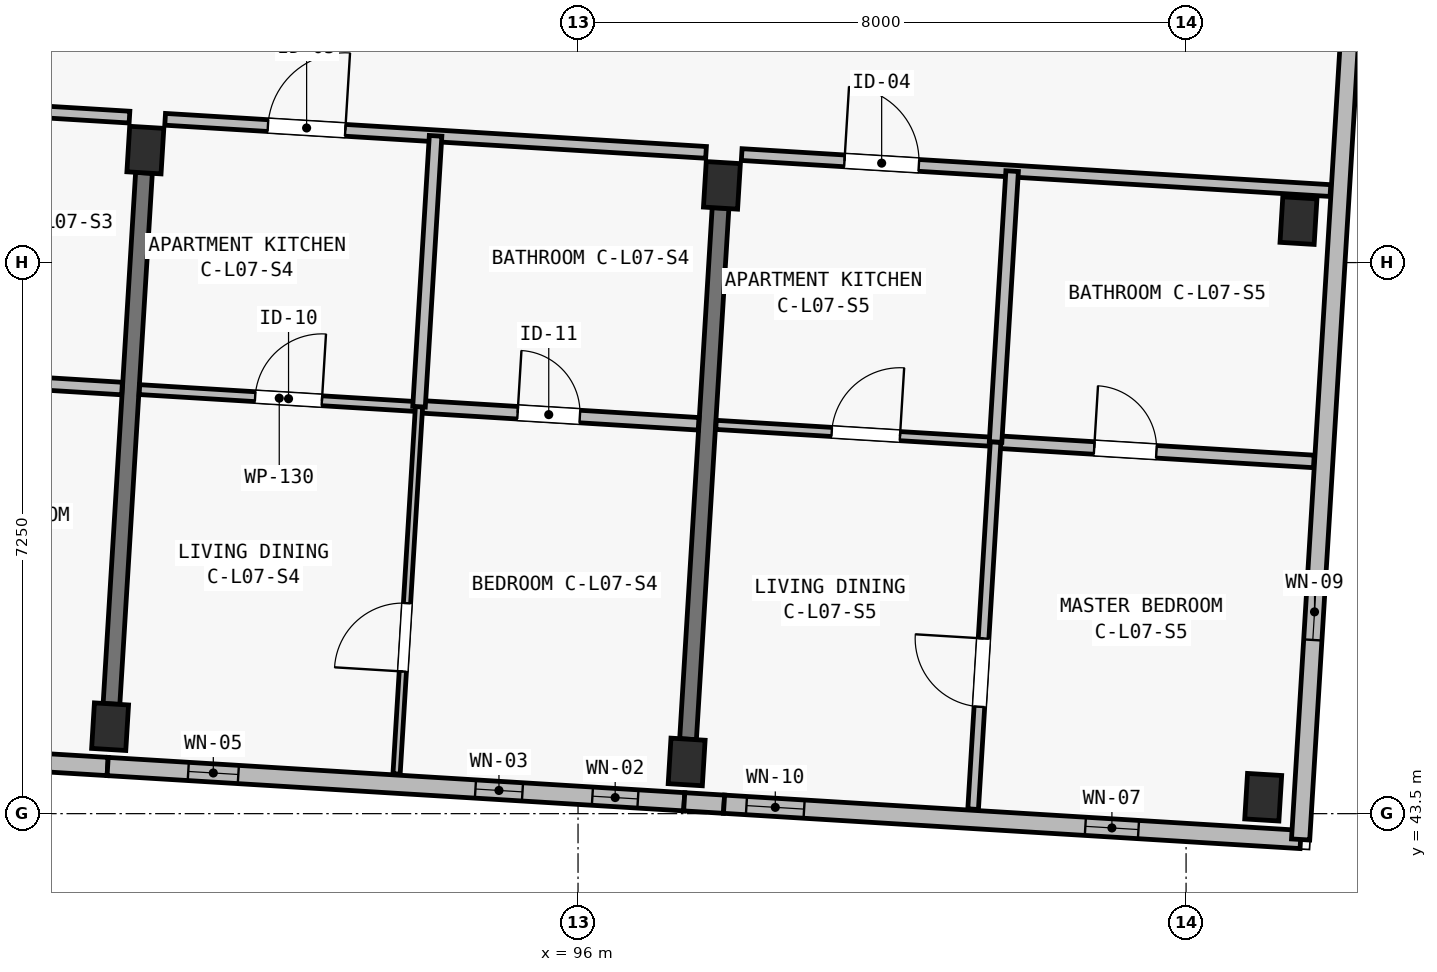
"""IFC4 building model, lengths in metres.
Left out: names, types, materials, properties, quantities, classifications, styles, units other than length and angle.
Written with IfcOpenShell. Run it as: python <this file> out.ifc"""

import sys

from ifc_helpers import new_model, si_unit, direction, frame, frame_2d, origin, origin_2d, place, context, subcontext, project, spatial, polyline, rectangle, outline, extrude, element, fill, save


model = new_model("IFC4")
c1 = context("Model", 3, precision=1e-05, world=origin(), true_north=direction((0.0, 1.0)))
c2 = subcontext(c1, "Body", "Model", "MODEL_VIEW")
j1 = project(units=[si_unit("LENGTHUNIT", "METRE"), si_unit("PLANEANGLEUNIT", "RADIAN")], contexts=[c1])
p1 = place(None, origin())
s1 = spatial("IfcSite", under=j1, at=p1, CompositionType="ELEMENT")
p2 = place(p1, origin())
s2 = spatial("IfcBuilding", under=s1, at=p2, CompositionType="ELEMENT")
p3 = place(p2, frame((0.0, 0.0, 24.65)))
s3 = spatial("IfcBuildingStorey", under=s2, at=p3, CompositionType="ELEMENT", Elevation=24.65)
for number, where, z_axis, x_axis in (
    (1, (89.843, 44.644, 0.0), (0.0, 0.0, 1.0), (0.998, -0.061, 0.0)),
    (2, (90.307, 52.23, 0.0), (0.0, 0.0, 1.0), (0.998, -0.061, 0.0)),
    (3, (97.429, 44.18, 0.0), (0.0, 0.0, 1.0), (0.998, -0.061, 0.0)),
    (4, (97.893, 51.766, 0.0), (0.0, 0.0, 1.0), (0.998, -0.061, 0.0)),
):
    element("IfcColumn", number, at=place(p3, frame(where, z_axis=z_axis, x_axis=x_axis)), inside=s3, PredefinedType="COLUMN", context=c2, shape_type="SweptSolid", body=[
        extrude(rectangle(XDim=0.45, YDim=0.6, at=origin_2d()), origin(), (0.0, 0.0, 1.0), 3.25),
    ])
for number, where, z_axis, x_axis in (
    (5, (105.015, 43.716, 0.0), (0.0, 0.0, 1.0), (0.998, -0.061, 0.0)),
    (6, (105.479, 51.302, 0.0), (0.0, 0.0, 1.0), (0.998, -0.061, 0.0)),
):
    element("IfcColumn", number, at=place(p3, frame(where, z_axis=z_axis, x_axis=x_axis)), inside=s3, PredefinedType="COLUMN", context=c2, shape_type="SweptSolid", body=[
        extrude(rectangle(XDim=0.45, YDim=0.6, at=origin_2d()), origin(), (0.0, 0.0, 1.0), 4.701),
    ])
for number, where, z_axis, x_axis in (
    (7, (89.862, 44.944, 0.0), (0.0, 0.0, 1.0), (0.061, 0.998, 0.0)),
    (8, (97.448, 44.479, 0.0), (0.0, 0.0, 1.0), (0.061, 0.998, 0.0)),
):
    element("IfcWall", number, at=place(p3, frame(where, z_axis=z_axis, x_axis=x_axis)), inside=s3, PredefinedType="SHEAR", context=c2, shape_type="SweptSolid", body=[
        extrude(rectangle(XDim=7.0, YDim=0.22, at=frame_2d((3.5, 0.0))), origin(), (0.0, 0.0, 1.0), 2.5),
    ])
p4 = place(p3, frame((89.811, 44.12, 0.0), z_axis=(0.0, 0.0, 1.0), x_axis=(-0.998135669243, 0.061034300063, 0.0)))
e9 = element("IfcWall", 9, at=p4, inside=s3, PredefinedType="SOLIDWALL", context=c2, shape_type="SweptSolid", body=[
    extrude(rectangle(XDim=7.6, YDim=0.24, at=frame_2d((3.8, 0.0))), origin(), (0.0, 0.0, 1.0), 3.0),
])
p5 = place(p4, frame((5.019, 0.0, 0.0)))
e10 = element("IfcOpeningElement", 10, at=p5, cuts=e9, PredefinedType="OPENING", context=c2, shape_type="SweptSolid", body=[
    extrude(rectangle(XDim=1.8, YDim=2.12, at=frame_2d((0.9, 1.06))), frame((0.0, 0.135, 0.0), z_axis=(0.0, -1.0, 0.0), x_axis=(1.0, 0.0, 0.0)), (0.0, 0.0, 1.0), 0.27),
])
p6 = place(p4, frame((0.83, 0.0, 0.46)))
e11 = element("IfcOpeningElement", 11, at=p6, cuts=e9, PredefinedType="OPENING", context=c2, shape_type="SweptSolid", body=[
    extrude(rectangle(XDim=0.7, YDim=2.36, at=frame_2d((0.35, 1.18))), frame((0.0, 0.135, 0.0), z_axis=(0.0, -1.0, 0.0), x_axis=(1.0, 0.0, 0.0)), (0.0, 0.0, 1.0), 0.27),
])
p7 = place(p3, frame((97.397, 43.656, 0.0), z_axis=(0.0, 0.0, 1.0), x_axis=(-0.998135549572, 0.061036257095, 0.0)))
e12 = element("IfcWall", 12, at=p7, inside=s3, PredefinedType="SOLIDWALL", context=c2, shape_type="SweptSolid", body=[
    extrude(rectangle(XDim=7.6, YDim=0.24, at=frame_2d((3.8, 0.0))), origin(), (0.0, 0.0, 1.0), 3.0),
])
p8 = place(p7, frame((0.61, 0.0, 0.52)))
e13 = element("IfcOpeningElement", 13, at=p8, cuts=e12, PredefinedType="OPENING", context=c2, shape_type="SweptSolid", body=[
    extrude(rectangle(XDim=0.6, YDim=2.22, at=frame_2d((0.3, 1.11))), frame((0.0, 0.135, 0.0), z_axis=(0.0, -1.0, 0.0), x_axis=(1.0, 0.0, 0.0)), (0.0, 0.0, 1.0), 0.27),
])
p9 = place(p7, frame((2.132, 0.0, 0.42)))
e14 = element("IfcOpeningElement", 14, at=p9, cuts=e12, PredefinedType="OPENING", context=c2, shape_type="SweptSolid", body=[
    extrude(rectangle(XDim=0.62, YDim=2.28, at=frame_2d((0.31, 1.14))), frame((0.0, 0.135, 0.0), z_axis=(0.0, -1.0, 0.0), x_axis=(1.0, 0.0, 0.0)), (0.0, 0.0, 1.0), 0.27),
])
p10 = place(p7, frame((5.877, 0.0, 0.52)))
e15 = element("IfcOpeningElement", 15, at=p10, cuts=e12, PredefinedType="OPENING", context=c2, shape_type="SweptSolid", body=[
    extrude(rectangle(XDim=0.66, YDim=2.32, at=frame_2d((0.33, 1.16))), frame((0.0, 0.135, 0.0), z_axis=(0.0, -1.0, 0.0), x_axis=(1.0, 0.0, 0.0)), (0.0, 0.0, 1.0), 0.27),
])
p11 = place(p3, frame((97.921, 43.624, 0.0), z_axis=(0.0, 0.0, 1.0), x_axis=(-0.99811537606, 0.061365267648, 0.0)))
e16 = element("IfcWall", 16, at=p11, inside=s3, PredefinedType="SOLIDWALL", context=c2, shape_type="SweptSolid", body=[
    extrude(rectangle(XDim=0.525, YDim=0.24, at=frame_2d((0.263, 0.0))), origin(), (0.0, 0.0, 1.0), 3.0),
])
p12 = place(p3, frame((105.507, 43.16, 0.0), z_axis=(0.0, 0.0, 1.0), x_axis=(-0.998135549572, 0.061036257095, 0.0)))
e17 = element("IfcWall", 17, at=p12, inside=s3, PredefinedType="SOLIDWALL", context=c2, shape_type="SweptSolid", body=[
    extrude(outline(polyline([(0.0, 0.0), (7.6, 0.0), (7.6, 6.548), (0.0, 5.085), (0.0, 0.0)])), frame((0.0, 0.12, 0.0), z_axis=(0.0, -1.0, 0.0), x_axis=(1.0, 0.0, 0.0)), (0.0, 0.0, 1.0), 0.24),
])
p13 = place(p12, frame((2.137, 0.0, 0.42)))
e18 = element("IfcOpeningElement", 18, at=p13, cuts=e17, PredefinedType="OPENING", context=c2, shape_type="SweptSolid", body=[
    extrude(rectangle(XDim=0.7, YDim=2.36, at=frame_2d((0.35, 1.18))), frame((0.0, 0.135, 0.0), z_axis=(0.0, -1.0, 0.0), x_axis=(1.0, 0.0, 0.0)), (0.0, 0.0, 1.0), 0.27),
])
p14 = place(p12, frame((6.545, 0.0, 0.42)))
e19 = element("IfcOpeningElement", 19, at=p14, cuts=e17, PredefinedType="OPENING", context=c2, shape_type="SweptSolid", body=[
    extrude(rectangle(XDim=0.76, YDim=2.34, at=frame_2d((0.38, 1.17))), frame((0.0, 0.135, 0.0), z_axis=(0.0, -1.0, 0.0), x_axis=(1.0, 0.0, 0.0)), (0.0, 0.0, 1.0), 0.27),
])
p15 = place(p3, frame((106.768, 63.771, 0.0), z_axis=(0.0, 0.0, 1.0), x_axis=(-0.061053332998, -0.99813450523, 0.0)))
e20 = element("IfcWall", 20, at=p15, inside=s3, PredefinedType="SOLIDWALL", context=c2, shape_type="SweptSolid", body=[
    extrude(rectangle(XDim=20.65, YDim=0.24, at=frame_2d((10.325, 0.0))), origin(), (0.0, 0.0, 1.0), 5.085),
])
p16 = place(p15, frame((2.99, 0.0, 0.52)))
e21 = element("IfcOpeningElement", 21, at=p16, cuts=e20, PredefinedType="OPENING", context=c2, shape_type="SweptSolid", body=[
    extrude(rectangle(XDim=0.6, YDim=2.22, at=frame_2d((0.3, 1.11))), frame((0.0, 0.135, 0.0), z_axis=(0.0, -1.0, 0.0), x_axis=(1.0, 0.0, 0.0)), (0.0, 0.0, 1.0), 0.27),
])
p17 = place(p15, frame((17.28, 0.0, 0.45)))
e22 = element("IfcOpeningElement", 22, at=p17, cuts=e20, PredefinedType="OPENING", context=c2, shape_type="SweptSolid", body=[
    extrude(rectangle(XDim=0.74, YDim=2.26, at=frame_2d((0.37, 1.13))), frame((0.0, 0.135, 0.0), z_axis=(0.0, -1.0, 0.0), x_axis=(1.0, 0.0, 0.0)), (0.0, 0.0, 1.0), 0.27),
])
p18 = place(p3, frame((82.982, 53.099, 0.0), z_axis=(0.0, 0.0, 1.0), x_axis=(0.998134569689, -0.061052279168, 0.0)))
e23 = element("IfcWall", 23, at=p18, inside=s3, PredefinedType="PARTITIONING", context=c2, shape_type="SweptSolid", body=[
    extrude(rectangle(XDim=7.13, YDim=0.155, at=frame_2d((3.565, 0.0))), origin(), (0.0, 0.0, 1.0), 2.97),
])
p19 = place(p18, frame((1.355, 0.0, 0.0)))
e24 = element("IfcOpeningElement", 24, at=p19, cuts=e23, PredefinedType="OPENING", context=c2, shape_type="SweptSolid", body=[
    extrude(rectangle(XDim=0.98, YDim=2.15, at=frame_2d((0.49, 1.075))), frame((0.0, 0.093, 0.0), z_axis=(0.0, -1.0, 0.0), x_axis=(1.0, 0.0, 0.0)), (0.0, 0.0, 1.0), 0.185),
])
p20 = place(p3, frame((86.322, 49.318, 0.0), z_axis=(0.0, 0.0, 1.0), x_axis=(0.998132682596, -0.061083123148, 0.0)))
e25 = element("IfcWall", 25, at=p20, inside=s3, PredefinedType="PLUMBINGWALL", context=c2, shape_type="SweptSolid", body=[
    extrude(rectangle(XDim=3.685, YDim=0.165, at=frame_2d((1.843, 0.0))), origin(), (0.0, 0.0, 1.0), 2.97),
])
p21 = place(p20, frame((1.3, 0.0, 0.0)))
e26 = element("IfcOpeningElement", 26, at=p21, cuts=e25, PredefinedType="OPENING", context=c2, shape_type="SweptSolid", body=[
    extrude(rectangle(XDim=0.82, YDim=2.08, at=frame_2d((0.41, 1.04))), frame((0.0, 0.097, 0.0), z_axis=(0.0, -1.0, 0.0), x_axis=(1.0, 0.0, 0.0)), (0.0, 0.0, 1.0), 0.195),
])
p22 = place(p3, frame((90.567, 52.635, 0.0), z_axis=(0.0, 0.0, 1.0), x_axis=(0.998134569689, -0.061052279168, 0.0)))
e27 = element("IfcWall", 27, at=p22, inside=s3, PredefinedType="PARTITIONING", context=c2, shape_type="SweptSolid", body=[
    extrude(rectangle(XDim=7.13, YDim=0.155, at=frame_2d((3.565, 0.0))), origin(), (0.0, 0.0, 1.0), 2.97),
])
p23 = place(p22, frame((1.355, 0.0, 0.0)))
e28 = element("IfcOpeningElement", 28, at=p23, cuts=e27, PredefinedType="OPENING", context=c2, shape_type="SweptSolid", body=[
    extrude(rectangle(XDim=1.02, YDim=2.2, at=frame_2d((0.51, 1.1))), frame((0.0, 0.093, 0.0), z_axis=(0.0, -1.0, 0.0), x_axis=(1.0, 0.0, 0.0)), (0.0, 0.0, 1.0), 0.185),
])
p24 = place(p3, frame((90.23, 49.079, 0.0), z_axis=(0.0, 0.0, 1.0), x_axis=(0.998132682596, -0.061083123148, 0.0)))
e29 = element("IfcWall", 29, at=p24, inside=s3, PredefinedType="PARTITIONING", context=c2, shape_type="SweptSolid", body=[
    extrude(rectangle(XDim=3.685, YDim=0.13, at=frame_2d((1.843, 0.0))), origin(), (0.0, 0.0, 1.0), 2.97),
])
p25 = place(p24, frame((1.525, 0.0, 0.0)))
e30 = element("IfcOpeningElement", 30, at=p25, cuts=e29, PredefinedType="OPENING", context=c2, shape_type="SweptSolid", body=[
    extrude(rectangle(XDim=0.88, YDim=2.1, at=frame_2d((0.44, 1.05))), frame((0.0, 0.08, 0.0), z_axis=(0.0, -1.0, 0.0), x_axis=(1.0, 0.0, 0.0)), (0.0, 0.0, 1.0), 0.16),
])
p26 = place(p3, frame((93.908, 48.854, 0.0), z_axis=(0.0, 0.0, 1.0), x_axis=(0.998136472989, -0.061021154439, 0.0)))
e31 = element("IfcWall", 31, at=p26, inside=s3, PredefinedType="PLUMBINGWALL", context=c2, shape_type="SweptSolid", body=[
    extrude(rectangle(XDim=3.685, YDim=0.165, at=frame_2d((1.842, 0.0))), origin(), (0.0, 0.0, 1.0), 2.97),
])
p27 = place(p26, frame((1.3, 0.0, 0.0)))
e32 = element("IfcOpeningElement", 32, at=p27, cuts=e31, PredefinedType="OPENING", context=c2, shape_type="SweptSolid", body=[
    extrude(rectangle(XDim=0.82, YDim=2.08, at=frame_2d((0.41, 1.04))), frame((0.0, 0.097, 0.0), z_axis=(0.0, -1.0, 0.0), x_axis=(1.0, 0.0, 0.0)), (0.0, 0.0, 1.0), 0.195),
])
p28 = place(p3, frame((93.612, 44.023, 0.0), z_axis=(0.0, 0.0, 1.0), x_axis=(0.061087499584, 0.99813241476, 0.0)))
e33 = element("IfcWall", 33, at=p28, inside=s3, PredefinedType="PARTITIONING", context=c2, shape_type="SweptSolid", body=[
    extrude(rectangle(XDim=4.84, YDim=0.095, at=frame_2d((2.42, 0.0))), origin(), (0.0, 0.0, 1.0), 2.97),
])
p29 = place(p28, frame((1.35, 0.0, 0.0)))
e34 = element("IfcOpeningElement", 34, at=p29, cuts=e33, PredefinedType="OPENING", context=c2, shape_type="SweptSolid", body=[
    extrude(rectangle(XDim=0.9, YDim=2.1, at=frame_2d((0.45, 1.05))), frame((0.0, 0.062, 0.0), z_axis=(0.0, -1.0, 0.0), x_axis=(1.0, 0.0, 0.0)), (0.0, 0.0, 1.0), 0.125),
])
p30 = place(p3, frame((93.908, 48.854, 0.0), z_axis=(0.0, 0.0, 1.0), x_axis=(0.060998831939, 0.998137837426, 0.0)))
e35 = element("IfcWall", 35, at=p30, inside=s3, PredefinedType="PLUMBINGWALL", context=c2, shape_type="SweptSolid", body=[
    extrude(rectangle(XDim=3.57, YDim=0.165, at=frame_2d((1.785, 0.0))), origin(), (0.0, 0.0, 1.0), 2.97),
])
p31 = place(p3, frame((98.153, 52.171, 0.0), z_axis=(0.0, 0.0, 1.0), x_axis=(0.998133734847, -0.061065926349, 0.0)))
e36 = element("IfcWall", 36, at=p31, inside=s3, PredefinedType="PARTITIONING", context=c2, shape_type="SweptSolid", body=[
    extrude(rectangle(XDim=7.76, YDim=0.155, at=frame_2d((3.88, 0.0))), origin(), (0.0, 0.0, 1.0), 2.97),
])
p32 = place(p31, frame((1.355, 0.0, 0.0)))
e37 = element("IfcOpeningElement", 37, at=p32, cuts=e36, PredefinedType="OPENING", context=c2, shape_type="SweptSolid", body=[
    extrude(rectangle(XDim=0.98, YDim=2.15, at=frame_2d((0.49, 1.075))), frame((0.0, 0.093, 0.0), z_axis=(0.0, -1.0, 0.0), x_axis=(1.0, 0.0, 0.0)), (0.0, 0.0, 1.0), 0.185),
])
p33 = place(p3, frame((97.816, 48.615, 0.0), z_axis=(0.0, 0.0, 1.0), x_axis=(0.998136472989, -0.061021154439, 0.0)))
e38 = element("IfcWall", 38, at=p33, inside=s3, PredefinedType="PARTITIONING", context=c2, shape_type="SweptSolid", body=[
    extrude(rectangle(XDim=3.685, YDim=0.12, at=frame_2d((1.842, 0.0))), origin(), (0.0, 0.0, 1.0), 2.97),
])
p34 = place(p33, frame((1.525, 0.0, 0.0)))
e39 = element("IfcOpeningElement", 39, at=p34, cuts=e38, PredefinedType="OPENING", context=c2, shape_type="SweptSolid", body=[
    extrude(rectangle(XDim=0.9, YDim=2.1, at=frame_2d((0.45, 1.05))), frame((0.0, 0.075, 0.0), z_axis=(0.0, -1.0, 0.0), x_axis=(1.0, 0.0, 0.0)), (0.0, 0.0, 1.0), 0.15),
])
p35 = place(p3, frame((101.494, 48.39, 0.0), z_axis=(0.0, 0.0, 1.0), x_axis=(0.99813479877, -0.061048533841, 0.0)))
e40 = element("IfcWall", 40, at=p35, inside=s3, PredefinedType="PLUMBINGWALL", context=c2, shape_type="SweptSolid", body=[
    extrude(rectangle(XDim=4.195, YDim=0.165, at=frame_2d((2.098, 0.0))), origin(), (0.0, 0.0, 1.0), 2.97),
])
p36 = place(p35, frame((1.3, 0.0, 0.0)))
e41 = element("IfcOpeningElement", 41, at=p36, cuts=e40, PredefinedType="OPENING", context=c2, shape_type="SweptSolid", body=[
    extrude(rectangle(XDim=0.82, YDim=2.08, at=frame_2d((0.41, 1.04))), frame((0.0, 0.097, 0.0), z_axis=(0.0, -1.0, 0.0), x_axis=(1.0, 0.0, 0.0)), (0.0, 0.0, 1.0), 0.195),
])
p37 = place(p3, frame((101.198, 43.559, 0.0), z_axis=(0.0, 0.0, 1.0), x_axis=(0.061034170677, 0.998135677155, 0.0)))
e42 = element("IfcWall", 42, at=p37, inside=s3, PredefinedType="PARTITIONING", context=c2, shape_type="SweptSolid", body=[
    extrude(rectangle(XDim=4.84, YDim=0.14, at=frame_2d((2.42, 0.0))), origin(), (0.0, 0.0, 1.0), 2.97),
])
p38 = place(p37, frame((1.35, 0.0, 0.0)))
e43 = element("IfcOpeningElement", 43, at=p38, cuts=e42, PredefinedType="OPENING", context=c2, shape_type="SweptSolid", body=[
    extrude(rectangle(XDim=0.9, YDim=2.1, at=frame_2d((0.45, 1.05))), frame((0.0, 0.085, 0.0), z_axis=(0.0, -1.0, 0.0), x_axis=(1.0, 0.0, 0.0)), (0.0, 0.0, 1.0), 0.17),
])
p39 = place(p3, frame((101.494, 48.39, 0.0), z_axis=(0.0, 0.0, 1.0), x_axis=(0.061071129902, 0.998133416479, 0.0)))
e44 = element("IfcWall", 44, at=p39, inside=s3, PredefinedType="PLUMBINGWALL", context=c2, shape_type="SweptSolid", body=[
    extrude(rectangle(XDim=3.57, YDim=0.165, at=frame_2d((1.785, 0.0))), origin(), (0.0, 0.0, 1.0), 2.97),
])
p40 = place(p8, origin())
e45 = element("IfcWindow", 45, at=p40, inside=s3, PartitioningType="SINGLE_PANEL", PredefinedType="WINDOW", context=c2, shape_type="SweptSolid", body=[
    extrude(rectangle(XDim=0.6, YDim=2.22, at=frame_2d((0.3, 1.11))), frame((0.0, 0.03, 0.0), z_axis=(0.0, -1.0, 0.0), x_axis=(1.0, 0.0, 0.0)), (0.0, 0.0, 1.0), 0.06),
])
fill(e13, e45)
p41 = place(p9, origin())
e46 = element("IfcWindow", 46, at=p41, inside=s3, PartitioningType="SINGLE_PANEL", PredefinedType="WINDOW", context=c2, shape_type="SweptSolid", body=[
    extrude(rectangle(XDim=0.62, YDim=2.28, at=frame_2d((0.31, 1.14))), frame((0.0, 0.03, 0.0), z_axis=(0.0, -1.0, 0.0), x_axis=(1.0, 0.0, 0.0)), (0.0, 0.0, 1.0), 0.06),
])
fill(e14, e46)
p42 = place(p10, origin())
e47 = element("IfcWindow", 47, at=p42, inside=s3, PartitioningType="SINGLE_PANEL", PredefinedType="WINDOW", context=c2, shape_type="SweptSolid", body=[
    extrude(rectangle(XDim=0.66, YDim=2.32, at=frame_2d((0.33, 1.16))), frame((0.0, 0.03, 0.0), z_axis=(0.0, -1.0, 0.0), x_axis=(1.0, 0.0, 0.0)), (0.0, 0.0, 1.0), 0.06),
])
fill(e15, e47)
p43 = place(p13, origin())
e48 = element("IfcWindow", 48, at=p43, inside=s3, PartitioningType="SINGLE_PANEL", PredefinedType="WINDOW", context=c2, shape_type="SweptSolid", body=[
    extrude(rectangle(XDim=0.7, YDim=2.36, at=frame_2d((0.35, 1.18))), frame((0.0, 0.03, 0.0), z_axis=(0.0, -1.0, 0.0), x_axis=(1.0, 0.0, 0.0)), (0.0, 0.0, 1.0), 0.06),
])
fill(e18, e48)
p44 = place(p14, origin())
e49 = element("IfcWindow", 49, at=p44, inside=s3, PartitioningType="SINGLE_PANEL", PredefinedType="WINDOW", context=c2, shape_type="SweptSolid", body=[
    extrude(rectangle(XDim=0.76, YDim=2.34, at=frame_2d((0.38, 1.17))), frame((0.0, 0.03, 0.0), z_axis=(0.0, -1.0, 0.0), x_axis=(1.0, 0.0, 0.0)), (0.0, 0.0, 1.0), 0.06),
])
fill(e19, e49)
p45 = place(p17, origin())
e50 = element("IfcWindow", 50, at=p45, inside=s3, PartitioningType="SINGLE_PANEL", PredefinedType="WINDOW", context=c2, shape_type="SweptSolid", body=[
    extrude(rectangle(XDim=0.74, YDim=2.26, at=frame_2d((0.37, 1.13))), frame((0.0, 0.03, 0.0), z_axis=(0.0, -1.0, 0.0), x_axis=(1.0, 0.0, 0.0)), (0.0, 0.0, 1.0), 0.06),
])
fill(e22, e50)
p46 = place(p23, origin())
e51 = element("IfcDoor", 51, at=p46, inside=s3, OperationType="SINGLE_SWING_RIGHT", PredefinedType="DOOR", context=c2, shape_type="SweptSolid", body=[
    extrude(rectangle(XDim=1.02, YDim=2.2, at=frame_2d((0.51, 1.1))), frame((0.0, 0.025, 0.0), z_axis=(0.0, -1.0, 0.0), x_axis=(1.0, 0.0, 0.0)), (0.0, 0.0, 1.0), 0.05),
])
fill(e28, e51)
p47 = place(p25, origin())
e52 = element("IfcDoor", 52, at=p47, inside=s3, OperationType="SINGLE_SWING_RIGHT", PredefinedType="DOOR", context=c2, shape_type="SweptSolid", body=[
    extrude(rectangle(XDim=0.88, YDim=2.1, at=frame_2d((0.44, 1.05))), frame((0.0, 0.025, 0.0), z_axis=(0.0, -1.0, 0.0), x_axis=(1.0, 0.0, 0.0)), (0.0, 0.0, 1.0), 0.05),
])
fill(e30, e52)
p48 = place(p27, origin())
e53 = element("IfcDoor", 53, at=p48, inside=s3, OperationType="SINGLE_SWING_LEFT", PredefinedType="DOOR", context=c2, shape_type="SweptSolid", body=[
    extrude(rectangle(XDim=0.82, YDim=2.08, at=frame_2d((0.41, 1.04))), frame((0.0, 0.025, 0.0), z_axis=(0.0, -1.0, 0.0), x_axis=(1.0, 0.0, 0.0)), (0.0, 0.0, 1.0), 0.05),
])
fill(e32, e53)
p49 = place(p29, origin())
e54 = element("IfcDoor", 54, at=p49, inside=s3, OperationType="SINGLE_SWING_LEFT", PredefinedType="DOOR", context=c2, shape_type="SweptSolid", body=[
    extrude(rectangle(XDim=0.9, YDim=2.1, at=frame_2d((0.45, 1.05))), frame((0.0, 0.025, 0.0), z_axis=(0.0, -1.0, 0.0), x_axis=(1.0, 0.0, 0.0)), (0.0, 0.0, 1.0), 0.05),
])
fill(e34, e54)
p50 = place(p32, origin())
e55 = element("IfcDoor", 55, at=p50, inside=s3, OperationType="SINGLE_SWING_LEFT", PredefinedType="DOOR", context=c2, shape_type="SweptSolid", body=[
    extrude(rectangle(XDim=0.98, YDim=2.15, at=frame_2d((0.49, 1.075))), frame((0.0, 0.025, 0.0), z_axis=(0.0, -1.0, 0.0), x_axis=(1.0, 0.0, 0.0)), (0.0, 0.0, 1.0), 0.05),
])
fill(e37, e55)
p51 = place(p34, origin())
e56 = element("IfcDoor", 56, at=p51, inside=s3, OperationType="SINGLE_SWING_RIGHT", PredefinedType="DOOR", context=c2, shape_type="SweptSolid", body=[
    extrude(rectangle(XDim=0.9, YDim=2.1, at=frame_2d((0.45, 1.05))), frame((0.0, 0.025, 0.0), z_axis=(0.0, -1.0, 0.0), x_axis=(1.0, 0.0, 0.0)), (0.0, 0.0, 1.0), 0.05),
])
fill(e39, e56)
p52 = place(p36, origin())
e57 = element("IfcDoor", 57, at=p52, inside=s3, OperationType="SINGLE_SWING_LEFT", PredefinedType="DOOR", context=c2, shape_type="SweptSolid", body=[
    extrude(rectangle(XDim=0.82, YDim=2.08, at=frame_2d((0.41, 1.04))), frame((0.0, 0.025, 0.0), z_axis=(0.0, -1.0, 0.0), x_axis=(1.0, 0.0, 0.0)), (0.0, 0.0, 1.0), 0.05),
])
fill(e41, e57)
p53 = place(p38, origin())
e58 = element("IfcDoor", 58, at=p53, inside=s3, OperationType="SINGLE_SWING_RIGHT", PredefinedType="DOOR", context=c2, shape_type="SweptSolid", body=[
    extrude(rectangle(XDim=0.9, YDim=2.1, at=frame_2d((0.45, 1.05))), frame((0.0, 0.025, 0.0), z_axis=(0.0, -1.0, 0.0), x_axis=(1.0, 0.0, 0.0)), (0.0, 0.0, 1.0), 0.05),
])
fill(e43, e58)
save(model, sys.argv[1])
